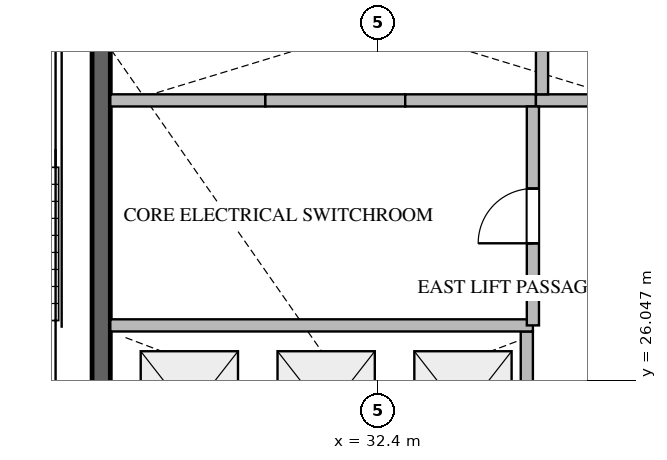
"""IFC4 building model, lengths in metres.
Left out: names, types, materials, properties, quantities, classifications, styles, units other than length and angle.
Written with IfcOpenShell. Run it as: python <this file> out.ifc"""

import sys

from ifc_helpers import new_model, si_unit, direction, frame, frame_2d, origin, place, context, subcontext, project, spatial, rectangle, extrude, source, transform, mapped, element, fill, save


model = new_model("IFC4")
c1 = context("Model", 3, precision=1e-05, world=origin(), true_north=direction((0.0, 1.0)))
c2 = subcontext(c1, "Body", "Model", "MODEL_VIEW")
j1 = project(units=[si_unit("LENGTHUNIT", "METRE"), si_unit("PLANEANGLEUNIT", "RADIAN")], contexts=[c1])
p1 = place(None, origin())
s1 = spatial("IfcSite", under=j1, at=p1, CompositionType="ELEMENT")
p2 = place(p1, origin())
s2 = spatial("IfcBuilding", under=s1, at=p2, CompositionType="ELEMENT")
p3 = place(p2, frame((0.0, 0.0, 183.9)))
s3 = spatial("IfcBuildingStorey", under=s2, at=p3, CompositionType="ELEMENT", Elevation=183.9)
p4 = place(p3, frame((27.85, 23.55, -0.26), z_axis=(0.0, 0.0, 1.0), x_axis=(0.0, 1.0, 0.0)))
e1 = element("IfcWall", 1, at=p4, inside=s3, PredefinedType="SHEAR", context=c2, shape_type="SweptSolid", body=[
    extrude(rectangle(XDim=9.85, YDim=0.3, at=frame_2d((4.925, 0.0))), origin(), (0.0, 0.0, 1.0), 3.748),
])
p5 = place(p3, frame((34.85, 24.35, 0.0), z_axis=(0.0, 0.0, 1.0), x_axis=(0.0, 1.0, 0.0)))
e2 = element("IfcWall", 2, at=p5, inside=s3, PredefinedType="STANDARD", context=c2, shape_type="SweptSolid", body=[
    extrude(rectangle(XDim=2.5, YDim=0.2, at=frame_2d((1.25, 0.0))), origin(), (0.0, 0.0, 1.0), 3.49),
])
p6 = place(p3, frame((28.0, 30.65, 0.0), z_axis=(0.0, 0.0, 1.0), x_axis=(1.0, 0.0, 0.0)))
e3 = element("IfcWall", 3, at=p6, inside=s3, PredefinedType="STANDARD", context=c2, shape_type="SweptSolid", body=[
    extrude(rectangle(XDim=2.55, YDim=0.2, at=frame_2d((1.275, 0.0))), origin(), (0.0, 0.0, 1.0), 3.49),
])
p7 = place(p3, frame((30.55, 30.65, 0.0), z_axis=(0.0, 0.0, 1.0), x_axis=(1.0, 0.0, 0.0)))
e4 = element("IfcWall", 4, at=p7, inside=s3, PredefinedType="STANDARD", context=c2, shape_type="SweptSolid", body=[
    extrude(rectangle(XDim=2.3, YDim=0.2, at=frame_2d((1.15, 0.0))), origin(), (0.0, 0.0, 1.0), 3.49),
])
p8 = place(p3, frame((32.85, 30.65, 0.0), z_axis=(0.0, 0.0, 1.0), x_axis=(1.0, 0.0, 0.0)))
e5 = element("IfcWall", 5, at=p8, inside=s3, PredefinedType="STANDARD", context=c2, shape_type="SweptSolid", body=[
    extrude(rectangle(XDim=2.15, YDim=0.2, at=frame_2d((1.075, 0.0))), origin(), (0.0, 0.0, 1.0), 3.49),
])
p9 = place(p3, frame((35.0, 30.65, 0.0), z_axis=(0.0, 0.0, 1.0), x_axis=(1.0, 0.0, 0.0)))
e6 = element("IfcWall", 6, at=p9, inside=s3, PredefinedType="STANDARD", context=c2, shape_type="SweptSolid", body=[
    extrude(rectangle(XDim=1.8, YDim=0.2, at=frame_2d((0.9, 0.0))), origin(), (0.0, 0.0, 1.0), 3.49),
])
p10 = place(p3, frame((35.1, 30.75, 0.0), z_axis=(0.0, 0.0, 1.0), x_axis=(0.0, 1.0, 0.0)))
e7 = element("IfcWall", 7, at=p10, inside=s3, PredefinedType="STANDARD", context=c2, shape_type="SweptSolid", body=[
    extrude(rectangle(XDim=2.65, YDim=0.2, at=frame_2d((1.325, 0.0))), origin(), (0.0, 0.0, 1.0), 3.49),
])
p11 = place(p3, frame((28.0, 26.95, 0.0), z_axis=(0.0, 0.0, 1.0), x_axis=(1.0, 0.0, 0.0)))
e8 = element("IfcWall", 8, at=p11, inside=s3, PredefinedType="STANDARD", context=c2, shape_type="SweptSolid", body=[
    extrude(rectangle(XDim=6.95, YDim=0.2, at=frame_2d((3.475, 0.0))), origin(), (0.0, 0.0, 1.0), 3.49),
])
p12 = place(p3, frame((34.95, 26.95, 0.0), z_axis=(0.0, 0.0, 1.0), x_axis=(0.0, 1.0, 0.0)))
e9 = element("IfcWall", 9, at=p12, inside=s3, PredefinedType="STANDARD", context=c2, shape_type="SweptSolid", body=[
    extrude(rectangle(XDim=3.6, YDim=0.2, at=frame_2d((1.8, 0.0))), origin(), (0.0, 0.0, 1.0), 3.49),
])
p13 = place(p12, frame((1.35, 0.0, 0.0)))
e10 = element("IfcOpeningElement", 10, at=p13, cuts=e9, PredefinedType="OPENING", context=c2, shape_type="SweptSolid", body=[
    extrude(rectangle(XDim=0.9, YDim=2.1, at=frame_2d((0.45, 1.05))), frame((0.0, 0.11, 0.0), z_axis=(0.0, -1.0, 0.0), x_axis=(1.0, 0.0, 0.0)), (0.0, 0.0, 1.0), 0.22),
])
m1 = source(origin(), c2, "Body", "SweptSolid", [
    extrude(rectangle(XDim=0.9, YDim=2.1, at=frame_2d((0.45, 1.05))), frame((0.0, 0.025, 0.0), z_axis=(0.0, -1.0, 0.0), x_axis=(1.0, 0.0, 0.0)), (0.0, 0.0, 1.0), 0.05),
])
p14 = place(p13, origin())
e11 = element("IfcDoor", 11, at=p14, inside=s3, OperationType="SINGLE_SWING_LEFT", PredefinedType="DOOR", context=c2, shape_type="MappedRepresentation", body=[
    mapped(m1, transform((0.0, 0.0, 0.0), scale=1.0)),
])
fill(e10, e11)
save(model, sys.argv[1])
